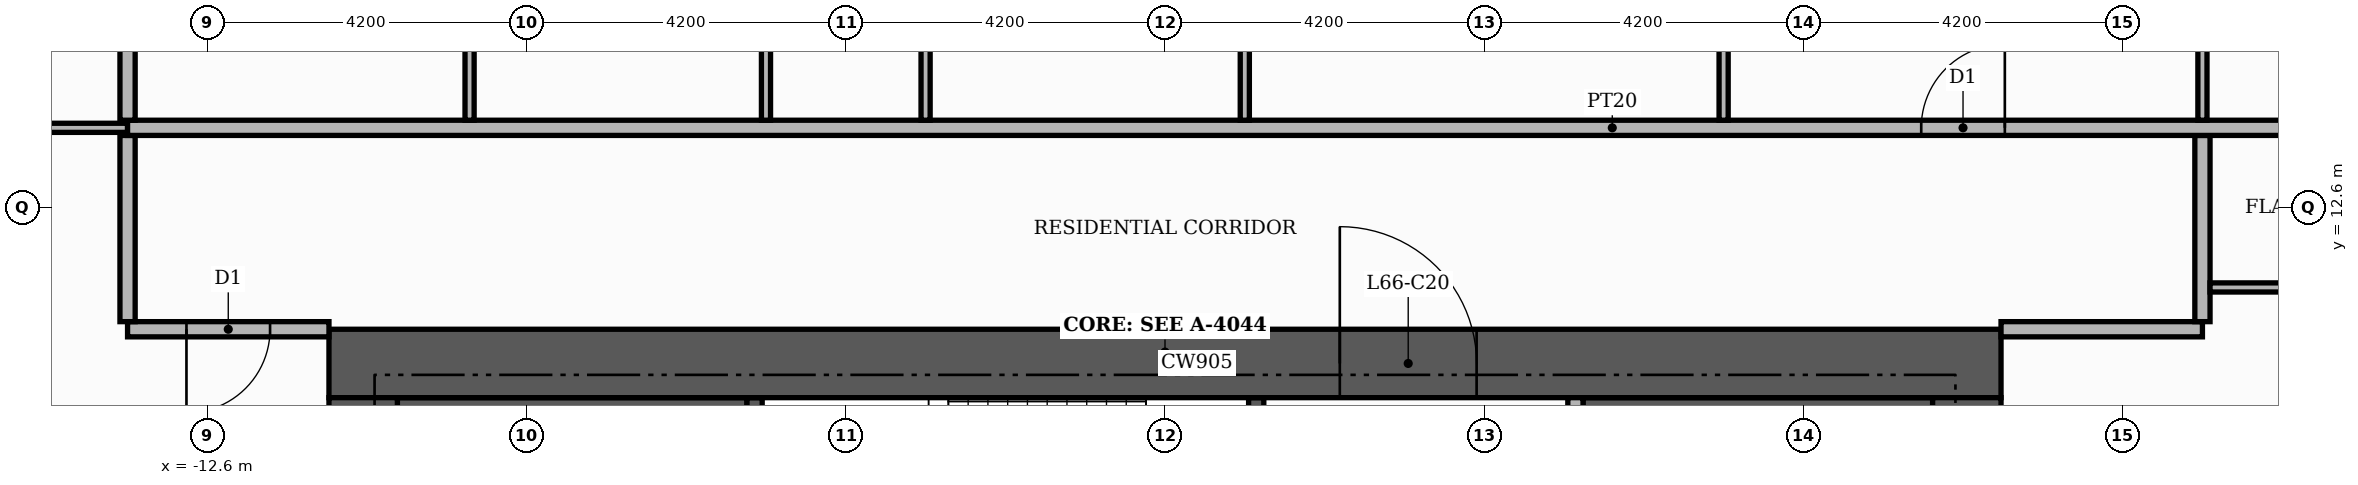
"""IFC4 building model, lengths in metres.
Left out: names, types, materials, properties, quantities, classifications, styles, units other than length and angle.
Written with IfcOpenShell. Run it as: python <this file> out.ifc"""

import sys

from ifc_helpers import new_model, si_unit, direction, frame, frame_2d, origin, place, context, subcontext, project, spatial, rectangle, extrude, element, fill, save


model = new_model("IFC4")
c1 = context("Model", 3, precision=1e-05, world=origin(), true_north=direction((0.0, 1.0)))
c2 = subcontext(c1, "Body", "Model", "MODEL_VIEW")
j1 = project(units=[si_unit("LENGTHUNIT", "METRE"), si_unit("PLANEANGLEUNIT", "RADIAN")], contexts=[c1])
p1 = place(None, origin())
s1 = spatial("IfcSite", under=j1, at=p1, CompositionType="ELEMENT")
p2 = place(p1, origin())
s2 = spatial("IfcBuilding", under=s1, at=p2, CompositionType="ELEMENT")
p3 = place(p2, frame((0.0, 0.0, 275.7)))
s3 = spatial("IfcBuildingStorey", under=s2, at=p3, CompositionType="ELEMENT", Elevation=275.7)
for number, where, z_axis, x_axis in (
    (1, (-10.1, 9.15, 0.0), (0.0, 0.0, 1.0), (1.0, 0.0, 0.0)),
    (2, (5.5, 9.15, 0.0), (0.0, 0.0, 1.0), (1.0, 0.0, 0.0)),
):
    element("IfcWall", number, at=place(p3, frame(where, z_axis=z_axis, x_axis=x_axis)), inside=s3, PredefinedType="SHEAR", context=c2, shape_type="SweptSolid", body=[
        extrude(rectangle(XDim=4.6, YDim=1.9, at=frame_2d((2.3, 0.0))), origin(), (0.0, 0.0, 1.0), 3.48),
    ])
p4 = place(p3, frame((-5.4, 7.25, 0.0), z_axis=(0.0, 0.0, 1.0), x_axis=(0.0, 1.0, 0.0)))
e3 = element("IfcWall", 3, at=p4, inside=s3, PredefinedType="SHEAR", context=c2, shape_type="SweptSolid", body=[
    extrude(rectangle(XDim=2.85, YDim=0.2, at=frame_2d((1.425, 0.0))), origin(), (0.0, 0.0, 1.0), 3.48),
])
p5 = place(p3, frame((1.2, 7.25, 0.0), z_axis=(0.0, 0.0, 1.0), x_axis=(0.0, 1.0, 0.0)))
e4 = element("IfcWall", 4, at=p5, inside=s3, PredefinedType="SHEAR", context=c2, shape_type="SweptSolid", body=[
    extrude(rectangle(XDim=2.85, YDim=0.2, at=frame_2d((1.425, 0.0))), origin(), (0.0, 0.0, 1.0), 3.48),
])
p6 = place(p5, frame((0.85, 0.0, 0.0)))
e5 = element("IfcOpeningElement", 5, at=p6, cuts=e4, PredefinedType="OPENING", context=c2, shape_type="SweptSolid", body=[
    extrude(rectangle(XDim=1.0, YDim=2.1, at=frame_2d((0.5, 1.05))), frame((0.0, 0.11, 0.0), z_axis=(0.0, -1.0, 0.0), x_axis=(1.0, 0.0, 0.0)), (0.0, 0.0, 1.0), 0.22),
])
p7 = place(p3, frame((-11.0, 10.55, 0.0), z_axis=(0.0, 0.0, 1.0), x_axis=(1.0, 0.0, 0.0)))
e6 = element("IfcWall", 6, at=p7, inside=s3, PredefinedType="SHEAR", context=c2, shape_type="SweptSolid", body=[
    extrude(rectangle(XDim=22.0, YDim=0.9, at=frame_2d((11.0, 0.0))), origin(), (0.0, 0.0, 1.0), 3.48),
])
p8 = place(p7, frame((13.3, 0.0, 0.0)))
e7 = element("IfcOpeningElement", 7, at=p8, cuts=e6, PredefinedType="OPENING", context=c2, shape_type="SweptSolid", body=[
    extrude(rectangle(XDim=1.8, YDim=2.2, at=frame_2d((0.9, 1.1))), frame((0.0, 0.46, 0.0), z_axis=(0.0, -1.0, 0.0), x_axis=(1.0, 0.0, 0.0)), (0.0, 0.0, 1.0), 0.92),
])
for number, where, z_axis, x_axis in (
    (8, (-10.55, -10.1, 0.0), (0.0, 0.0, 1.0), (0.0, 1.0, 0.0)),
    (9, (10.55, -10.1, 0.0), (0.0, 0.0, 1.0), (0.0, 1.0, 0.0)),
):
    element("IfcWall", number, at=place(p3, frame(where, z_axis=z_axis, x_axis=x_axis)), inside=s3, PredefinedType="SHEAR", context=c2, shape_type="SweptSolid", body=[
        extrude(rectangle(XDim=20.2, YDim=0.9, at=frame_2d((10.1, 0.0))), origin(), (0.0, 0.0, 1.0), 3.48),
    ])
p9 = place(p3, frame((5.4, 5.5, 0.0), z_axis=(0.0, 0.0, 1.0), x_axis=(0.0, 1.0, 0.0)))
e10 = element("IfcWall", 10, at=p9, inside=s3, PredefinedType="PARTITIONING", context=c2, shape_type="SweptSolid", body=[
    extrude(rectangle(XDim=4.6, YDim=0.2, at=frame_2d((2.3, 0.0))), origin(), (0.0, 0.0, 1.0), 3.48),
])
p10 = place(p9, frame((0.25, 0.0, 0.0)))
e11 = element("IfcOpeningElement", 11, at=p10, cuts=e10, PredefinedType="OPENING", context=c2, shape_type="SweptSolid", body=[
    extrude(rectangle(XDim=1.0, YDim=2.1, at=frame_2d((0.5, 1.05))), frame((0.0, 0.11, 0.0), z_axis=(0.0, -1.0, 0.0), x_axis=(1.0, 0.0, 0.0)), (0.0, 0.0, 1.0), 0.22),
])
p11 = place(p3, frame((-13.65, 11.0, 0.0), z_axis=(0.0, 0.0, 1.0), x_axis=(1.0, 0.0, 0.0)))
e12 = element("IfcWall", 12, at=p11, inside=s3, PredefinedType="PARTITIONING", context=c2, shape_type="SweptSolid", body=[
    extrude(rectangle(XDim=2.65, YDim=0.2, at=frame_2d((1.325, 0.0))), origin(), (0.0, 0.0, 1.0), 3.48),
])
p12 = place(p11, frame((0.775, 0.0, 0.0)))
e13 = element("IfcOpeningElement", 13, at=p12, cuts=e12, PredefinedType="OPENING", context=c2, shape_type="SweptSolid", body=[
    extrude(rectangle(XDim=1.1, YDim=2.4, at=frame_2d((0.55, 1.2))), frame((0.0, 0.11, 0.0), z_axis=(0.0, -1.0, 0.0), x_axis=(1.0, 0.0, 0.0)), (0.0, 0.0, 1.0), 0.22),
])
p13 = place(p3, frame((11.0, 11.0, 0.0), z_axis=(0.0, 0.0, 1.0), x_axis=(1.0, 0.0, 0.0)))
e14 = element("IfcWall", 14, at=p13, inside=s3, PredefinedType="PARTITIONING", context=c2, shape_type="SweptSolid", body=[
    extrude(rectangle(XDim=2.65, YDim=0.2, at=frame_2d((1.325, 0.0))), origin(), (0.0, 0.0, 1.0), 3.48),
])
for number, where, z_axis, x_axis in (
    (15, (-13.65, 11.1, 0.0), (0.0, 0.0, 1.0), (0.0, 1.0, 0.0)),
    (16, (13.65, 11.1, 0.0), (0.0, 0.0, 1.0), (0.0, 1.0, 0.0)),
):
    element("IfcWall", number, at=place(p3, frame(where, z_axis=z_axis, x_axis=x_axis)), inside=s3, PredefinedType="PARTITIONING", context=c2, shape_type="SweptSolid", body=[
        extrude(rectangle(XDim=2.45, YDim=0.2, at=frame_2d((1.225, 0.0))), origin(), (0.0, 0.0, 1.0), 3.48),
    ])
p14 = place(p3, frame((13.75, 11.55, 0.0), z_axis=(0.0, 0.0, 1.0), x_axis=(1.0, 0.0, 0.0)))
e17 = element("IfcWall", 17, at=p14, inside=s3, PredefinedType="PARTITIONING", context=c2, shape_type="SweptSolid", body=[
    extrude(rectangle(XDim=4.57, YDim=0.12, at=frame_2d((2.285, 0.0))), origin(), (0.0, 0.0, 1.0), 3.48),
])
p15 = place(p3, frame((-20.72, 13.65, 0.0), z_axis=(0.0, 0.0, 1.0), x_axis=(1.0, 0.0, 0.0)))
e18 = element("IfcWall", 18, at=p15, inside=s3, PredefinedType="PARTITIONING", context=c2, shape_type="SweptSolid", body=[
    extrude(rectangle(XDim=7.07, YDim=0.12, at=frame_2d((3.535, 0.0))), origin(), (0.0, 0.0, 1.0), 3.48),
])
p16 = place(p15, frame((3.085, 0.0, 0.0)))
e19 = element("IfcOpeningElement", 19, at=p16, cuts=e18, PredefinedType="OPENING", context=c2, shape_type="SweptSolid", body=[
    extrude(rectangle(XDim=0.9, YDim=2.1, at=frame_2d((0.45, 1.05))), frame((0.0, 0.07, 0.0), z_axis=(0.0, -1.0, 0.0), x_axis=(1.0, 0.0, 0.0)), (0.0, 0.0, 1.0), 0.14),
])
p17 = place(p3, frame((-13.65, 13.65, 0.0), z_axis=(0.0, 0.0, 1.0), x_axis=(1.0, 0.0, 0.0)))
e20 = element("IfcWall", 20, at=p17, inside=s3, PredefinedType="PARTITIONING", context=c2, shape_type="SweptSolid", body=[
    extrude(rectangle(XDim=39.07, YDim=0.2, at=frame_2d((19.535, 0.0))), origin(), (0.0, 0.0, 1.0), 3.48),
])
p18 = place(p17, frame((23.6, 0.0, 0.0)))
e21 = element("IfcOpeningElement", 21, at=p18, cuts=e20, PredefinedType="OPENING", context=c2, shape_type="SweptSolid", body=[
    extrude(rectangle(XDim=1.1, YDim=2.4, at=frame_2d((0.55, 1.2))), frame((0.0, 0.11, 0.0), z_axis=(0.0, -1.0, 0.0), x_axis=(1.0, 0.0, 0.0)), (0.0, 0.0, 1.0), 0.22),
])
p19 = place(p3, frame((-13.65, 13.75, 0.0), z_axis=(0.0, 0.0, 1.0), x_axis=(0.0, 1.0, 0.0)))
e22 = element("IfcWall", 22, at=p19, inside=s3, PredefinedType="PARTITIONING", context=c2, shape_type="SweptSolid", body=[
    extrude(rectangle(XDim=11.67, YDim=0.2, at=frame_2d((5.835, 0.0))), origin(), (0.0, 0.0, 1.0), 3.48),
])
for number, where, z_axis, x_axis in (
    (23, (-9.15, 13.75, 0.0), (0.0, 0.0, 1.0), (0.0, 1.0, 0.0)),
    (24, (-5.25, 13.75, 0.0), (0.0, 0.0, 1.0), (0.0, 1.0, 0.0)),
    (25, (-3.15, 13.75, 0.0), (0.0, 0.0, 1.0), (0.0, 1.0, 0.0)),
    (26, (1.05, 13.75, 0.0), (0.0, 0.0, 1.0), (0.0, 1.0, 0.0)),
    (27, (7.35, 13.75, 0.0), (0.0, 0.0, 1.0), (0.0, 1.0, 0.0)),
):
    element("IfcWall", number, at=place(p3, frame(where, z_axis=z_axis, x_axis=x_axis)), inside=s3, PredefinedType="PARTITIONING", context=c2, shape_type="SweptSolid", body=[
        extrude(rectangle(XDim=4.81, YDim=0.12, at=frame_2d((2.405, 0.0))), origin(), (0.0, 0.0, 1.0), 3.48),
    ])
p20 = place(p3, frame((13.65, 13.75, 0.0), z_axis=(0.0, 0.0, 1.0), x_axis=(0.0, 1.0, 0.0)))
e28 = element("IfcWall", 28, at=p20, inside=s3, PredefinedType="PARTITIONING", context=c2, shape_type="SweptSolid", body=[
    extrude(rectangle(XDim=6.31, YDim=0.12, at=frame_2d((3.155, 0.0))), origin(), (0.0, 0.0, 1.0), 3.48),
])
p21 = place(p20, frame((2.685, 0.0, 0.0)))
e29 = element("IfcOpeningElement", 29, at=p21, cuts=e28, PredefinedType="OPENING", context=c2, shape_type="SweptSolid", body=[
    extrude(rectangle(XDim=0.9, YDim=2.1, at=frame_2d((0.45, 1.05))), frame((0.0, 0.07, 0.0), z_axis=(0.0, -1.0, 0.0), x_axis=(1.0, 0.0, 0.0)), (0.0, 0.0, 1.0), 0.14),
])
p22 = place(p8, origin())
e30 = element("IfcDoor", 30, at=p22, inside=s3, OperationType="DOUBLE_DOOR_SINGLE_SWING", PredefinedType="DOOR", context=c2, shape_type="SweptSolid", body=[
    extrude(rectangle(XDim=1.8, YDim=2.2, at=frame_2d((0.9, 1.1))), frame((0.0, 0.025, 0.0), z_axis=(0.0, -1.0, 0.0), x_axis=(1.0, 0.0, 0.0)), (0.0, 0.0, 1.0), 0.05),
])
fill(e7, e30)
p23 = place(p18, origin())
e31 = element("IfcDoor", 31, at=p23, inside=s3, OperationType="SINGLE_SWING_RIGHT", PredefinedType="DOOR", context=c2, shape_type="SweptSolid", body=[
    extrude(rectangle(XDim=1.1, YDim=2.4, at=frame_2d((0.55, 1.2))), frame((0.0, 0.025, 0.0), z_axis=(0.0, -1.0, 0.0), x_axis=(1.0, 0.0, 0.0)), (0.0, 0.0, 1.0), 0.05),
])
fill(e21, e31)
p24 = place(p12, frame((1.1, 0.0, 0.0), z_axis=(0.0, 0.0, 1.0), x_axis=(-1.0, 0.0, 0.0)))
e32 = element("IfcDoor", 32, at=p24, inside=s3, OperationType="SINGLE_SWING_LEFT", PredefinedType="DOOR", context=c2, shape_type="SweptSolid", body=[
    extrude(rectangle(XDim=1.1, YDim=2.4, at=frame_2d((0.55, 1.2))), frame((0.0, 0.025, 0.0), z_axis=(0.0, -1.0, 0.0), x_axis=(1.0, 0.0, 0.0)), (0.0, 0.0, 1.0), 0.05),
])
fill(e13, e32)
save(model, sys.argv[1])
